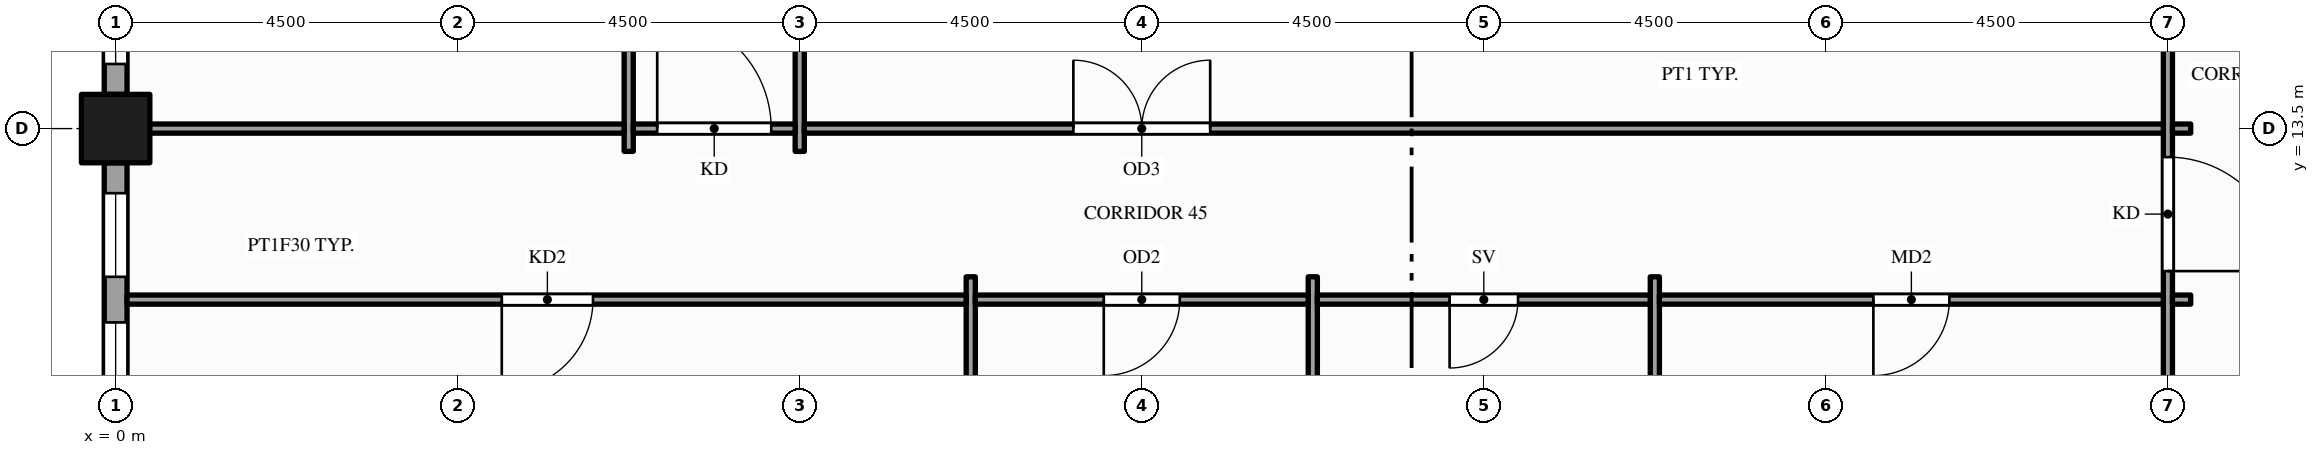
"""IFC4 building model, lengths in metres.
Left out: names, types, materials, properties, quantities, classifications, styles, units other than length and angle.
Written with IfcOpenShell. Run it as: python <this file> out.ifc"""

import sys

from ifc_helpers import new_model, si_unit, direction, frame, frame_2d, origin, origin_2d, place, context, subcontext, project, spatial, rectangle, hollow_rectangle, extrude, element, fill, save


model = new_model("IFC4")
c1 = context("Model", 3, precision=1e-05, world=origin(), true_north=direction((0.0, 1.0)))
c2 = subcontext(c1, "Body", "Model", "MODEL_VIEW")
j1 = project(units=[si_unit("LENGTHUNIT", "METRE"), si_unit("PLANEANGLEUNIT", "RADIAN")], contexts=[c1])
p1 = place(None, origin())
s1 = spatial("IfcSite", under=j1, at=p1, CompositionType="ELEMENT")
p2 = place(p1, origin())
s2 = spatial("IfcBuilding", under=s1, at=p2, CompositionType="ELEMENT")
p3 = place(p2, frame((0.0, 0.0, 171.0)))
s3 = spatial("IfcBuildingStorey", under=s2, at=p3, CompositionType="ELEMENT", Elevation=171.0)
p4 = place(p3, frame((0.0, 13.5, -0.15), z_axis=(0.0, 0.0, 1.0), x_axis=(1.0, 0.0, 0.0)))
e1 = element("IfcColumn", 1, at=p4, inside=s3, PredefinedType="COLUMN", context=c2, shape_type="SweptSolid", body=[
    extrude(hollow_rectangle(XDim=0.9, YDim=0.9, WallThickness=0.045, at=origin_2d()), origin(), (0.0, 0.0, 1.0), 4.0),
])
p5 = place(p3, frame((0.0, 17.55, 0.0), z_axis=(0.0, 0.0, 1.0), x_axis=(0.0, -1.0, 0.0)))
e2 = element("IfcWall", 2, at=p5, inside=s3, PredefinedType="STANDARD", context=c2, shape_type="SweptSolid", body=[
    extrude(rectangle(XDim=3.6, YDim=0.3, at=frame_2d((1.8, 0.0))), origin(), (0.0, 0.0, 1.0), 3.149),
])
p6 = place(p5, frame((0.4, 0.0, 0.9)))
e3 = element("IfcOpeningElement", 3, at=p6, cuts=e2, PredefinedType="OPENING", context=c2, shape_type="SweptSolid", body=[
    extrude(rectangle(XDim=1.1, YDim=2.0, at=frame_2d((0.55, 1.0))), frame((0.0, 0.16, 0.0), z_axis=(0.0, -1.0, 0.0), x_axis=(1.0, 0.0, 0.0)), (0.0, 0.0, 1.0), 0.32),
])
p7 = place(p5, frame((2.1, 0.0, 0.9)))
e4 = element("IfcOpeningElement", 4, at=p7, cuts=e2, PredefinedType="OPENING", context=c2, shape_type="SweptSolid", body=[
    extrude(rectangle(XDim=1.1, YDim=2.0, at=frame_2d((0.55, 1.0))), frame((0.0, 0.16, 0.0), z_axis=(0.0, -1.0, 0.0), x_axis=(1.0, 0.0, 0.0)), (0.0, 0.0, 1.0), 0.32),
])
p8 = place(p3, frame((0.0, 13.05, 0.0), z_axis=(0.0, 0.0, 1.0), x_axis=(0.0, -1.0, 0.0)))
e5 = element("IfcWall", 5, at=p8, inside=s3, PredefinedType="STANDARD", context=c2, shape_type="SweptSolid", body=[
    extrude(rectangle(XDim=3.6, YDim=0.3, at=frame_2d((1.8, 0.0))), origin(), (0.0, 0.0, 1.0), 3.149),
])
p9 = place(p8, frame((0.4, 0.0, 0.9)))
e6 = element("IfcOpeningElement", 6, at=p9, cuts=e5, PredefinedType="OPENING", context=c2, shape_type="SweptSolid", body=[
    extrude(rectangle(XDim=1.1, YDim=2.0, at=frame_2d((0.55, 1.0))), frame((0.0, 0.16, 0.0), z_axis=(0.0, -1.0, 0.0), x_axis=(1.0, 0.0, 0.0)), (0.0, 0.0, 1.0), 0.32),
])
p10 = place(p8, frame((2.1, 0.0, 0.9)))
e7 = element("IfcOpeningElement", 7, at=p10, cuts=e5, PredefinedType="OPENING", context=c2, shape_type="SweptSolid", body=[
    extrude(rectangle(XDim=1.1, YDim=2.0, at=frame_2d((0.55, 1.0))), frame((0.0, 0.16, 0.0), z_axis=(0.0, -1.0, 0.0), x_axis=(1.0, 0.0, 0.0)), (0.0, 0.0, 1.0), 0.32),
])
p11 = place(p3, frame((6.75, 13.2, 0.0), z_axis=(0.0, 0.0, 1.0), x_axis=(0.0, 1.0, 0.0)))
e8 = element("IfcWall", 8, at=p11, inside=s3, PredefinedType="PARTITIONING", context=c2, shape_type="SweptSolid", body=[
    extrude(rectangle(XDim=18.6, YDim=0.12, at=frame_2d((9.3, 0.0))), origin(), (0.0, 0.0, 1.0), 2.6),
])
p12 = place(p11, frame((3.175, 0.0, 0.0)))
e9 = element("IfcOpeningElement", 9, at=p12, cuts=e8, PredefinedType="OPENING", context=c2, shape_type="SweptSolid", body=[
    extrude(rectangle(XDim=1.0, YDim=2.1, at=frame_2d((0.5, 1.05))), frame((0.0, 0.07, 0.0), z_axis=(0.0, -1.0, 0.0), x_axis=(1.0, 0.0, 0.0)), (0.0, 0.0, 1.0), 0.14),
])
p13 = place(p11, frame((9.955, 0.0, 0.0)))
e10 = element("IfcOpeningElement", 10, at=p13, cuts=e8, PredefinedType="OPENING", context=c2, shape_type="SweptSolid", body=[
    extrude(rectangle(XDim=1.0, YDim=2.1, at=frame_2d((0.5, 1.05))), frame((0.0, 0.07, 0.0), z_axis=(0.0, -1.0, 0.0), x_axis=(1.0, 0.0, 0.0)), (0.0, 0.0, 1.0), 0.14),
])
p14 = place(p3, frame((9.0, 13.2, 0.0), z_axis=(0.0, 0.0, 1.0), x_axis=(0.0, 1.0, 0.0)))
e11 = element("IfcWall", 11, at=p14, inside=s3, PredefinedType="PARTITIONING", context=c2, shape_type="SweptSolid", body=[
    extrude(rectangle(XDim=18.6, YDim=0.12, at=frame_2d((9.3, 0.0))), origin(), (0.0, 0.0, 1.0), 2.6),
])
p15 = place(p14, frame((14.325, 0.0, 0.0)))
e12 = element("IfcOpeningElement", 12, at=p15, cuts=e11, PredefinedType="OPENING", context=c2, shape_type="SweptSolid", body=[
    extrude(rectangle(XDim=1.2, YDim=2.1, at=frame_2d((0.6, 1.05))), frame((0.0, 0.07, 0.0), z_axis=(0.0, -1.0, 0.0), x_axis=(1.0, 0.0, 0.0)), (0.0, 0.0, 1.0), 0.14),
])
p16 = place(p14, frame((4.2, 0.0, 0.0)))
e13 = element("IfcOpeningElement", 13, at=p16, cuts=e11, PredefinedType="OPENING", context=c2, shape_type="SweptSolid", body=[
    extrude(rectangle(XDim=1.2, YDim=2.1, at=frame_2d((0.6, 1.05))), frame((0.0, 0.07, 0.0), z_axis=(0.0, -1.0, 0.0), x_axis=(1.0, 0.0, 0.0)), (0.0, 0.0, 1.0), 0.14),
])
for number, where, z_axis, x_axis in (
    (14, (11.25, 0.15, 0.0), (0.0, 0.0, 1.0), (0.0, 1.0, 0.0)),
    (15, (15.75, 0.15, 0.0), (0.0, 0.0, 1.0), (0.0, 1.0, 0.0)),
    (16, (20.25, 0.15, 0.0), (0.0, 0.0, 1.0), (0.0, 1.0, 0.0)),
):
    element("IfcWall", number, at=place(p3, frame(where, z_axis=z_axis, x_axis=x_axis)), inside=s3, PredefinedType="PARTITIONING", context=c2, shape_type="SweptSolid", body=[
        extrude(rectangle(XDim=11.4, YDim=0.12, at=frame_2d((5.7, 0.0))), origin(), (0.0, 0.0, 1.0), 2.87),
    ])
p17 = place(p3, frame((27.0, 1.65, 0.0), z_axis=(0.0, 0.0, 1.0), x_axis=(0.0, 1.0, 0.0)))
e17 = element("IfcWall", 17, at=p17, inside=s3, PredefinedType="PARTITIONING", context=c2, shape_type="SweptSolid", body=[
    extrude(rectangle(XDim=22.2, YDim=0.12, at=frame_2d((11.1, 0.0))), origin(), (0.0, 0.0, 1.0), 2.87),
])
p18 = place(p17, frame((9.975, 0.0, 0.0)))
e18 = element("IfcOpeningElement", 18, at=p18, cuts=e17, PredefinedType="OPENING", context=c2, shape_type="SweptSolid", body=[
    extrude(rectangle(XDim=1.5, YDim=2.1, at=frame_2d((0.75, 1.05))), frame((0.0, 0.07, 0.0), z_axis=(0.0, -1.0, 0.0), x_axis=(1.0, 0.0, 0.0)), (0.0, 0.0, 1.0), 0.14),
])
p19 = place(p17, frame((13.125, 0.0, 0.0)))
e19 = element("IfcOpeningElement", 19, at=p19, cuts=e17, PredefinedType="OPENING", context=c2, shape_type="SweptSolid", body=[
    extrude(rectangle(XDim=1.2, YDim=2.1, at=frame_2d((0.6, 1.05))), frame((0.0, 0.07, 0.0), z_axis=(0.0, -1.0, 0.0), x_axis=(1.0, 0.0, 0.0)), (0.0, 0.0, 1.0), 0.14),
])
p20 = place(p3, frame((0.15, 11.25, 0.0), z_axis=(0.0, 0.0, 1.0), x_axis=(1.0, 0.0, 0.0)))
e20 = element("IfcWall", 20, at=p20, inside=s3, PredefinedType="PARTITIONING", context=c2, shape_type="SweptSolid", body=[
    extrude(rectangle(XDim=11.04, YDim=0.12, at=frame_2d((5.52, 0.0))), origin(), (0.0, 0.0, 1.0), 2.87),
])
p21 = place(p20, frame((4.93, 0.0, 0.0)))
e21 = element("IfcOpeningElement", 21, at=p21, cuts=e20, PredefinedType="OPENING", context=c2, shape_type="SweptSolid", body=[
    extrude(rectangle(XDim=1.2, YDim=2.1, at=frame_2d((0.6, 1.05))), frame((0.0, 0.07, 0.0), z_axis=(0.0, -1.0, 0.0), x_axis=(1.0, 0.0, 0.0)), (0.0, 0.0, 1.0), 0.14),
])
p22 = place(p3, frame((11.31, 11.25, 0.0), z_axis=(0.0, 0.0, 1.0), x_axis=(1.0, 0.0, 0.0)))
e22 = element("IfcWall", 22, at=p22, inside=s3, PredefinedType="PARTITIONING", context=c2, shape_type="SweptSolid", body=[
    extrude(rectangle(XDim=4.38, YDim=0.12, at=frame_2d((2.19, 0.0))), origin(), (0.0, 0.0, 1.0), 2.87),
])
p23 = place(p22, frame((1.69, 0.0, 0.0)))
e23 = element("IfcOpeningElement", 23, at=p23, cuts=e22, PredefinedType="OPENING", context=c2, shape_type="SweptSolid", body=[
    extrude(rectangle(XDim=1.0, YDim=2.1, at=frame_2d((0.5, 1.05))), frame((0.0, 0.07, 0.0), z_axis=(0.0, -1.0, 0.0), x_axis=(1.0, 0.0, 0.0)), (0.0, 0.0, 1.0), 0.14),
])
p24 = place(p3, frame((15.81, 11.25, 0.0), z_axis=(0.0, 0.0, 1.0), x_axis=(1.0, 0.0, 0.0)))
e24 = element("IfcWall", 24, at=p24, inside=s3, PredefinedType="PARTITIONING", context=c2, shape_type="SweptSolid", body=[
    extrude(rectangle(XDim=4.38, YDim=0.12, at=frame_2d((2.19, 0.0))), origin(), (0.0, 0.0, 1.0), 2.87),
])
p25 = place(p24, frame((1.74, 0.0, 0.0)))
e25 = element("IfcOpeningElement", 25, at=p25, cuts=e24, PredefinedType="OPENING", context=c2, shape_type="SweptSolid", body=[
    extrude(rectangle(XDim=0.9, YDim=2.1, at=frame_2d((0.45, 1.05))), frame((0.0, 0.07, 0.0), z_axis=(0.0, -1.0, 0.0), x_axis=(1.0, 0.0, 0.0)), (0.0, 0.0, 1.0), 0.14),
])
p26 = place(p3, frame((20.31, 11.25, 0.0), z_axis=(0.0, 0.0, 1.0), x_axis=(1.0, 0.0, 0.0)))
e26 = element("IfcWall", 26, at=p26, inside=s3, PredefinedType="PARTITIONING", context=c2, shape_type="SweptSolid", body=[
    extrude(rectangle(XDim=6.63, YDim=0.12, at=frame_2d((3.315, 0.0))), origin(), (0.0, 0.0, 1.0), 2.87),
])
p27 = place(p26, frame((2.815, 0.0, 0.0)))
e27 = element("IfcOpeningElement", 27, at=p27, cuts=e26, PredefinedType="OPENING", context=c2, shape_type="SweptSolid", body=[
    extrude(rectangle(XDim=1.0, YDim=2.1, at=frame_2d((0.5, 1.05))), frame((0.0, 0.07, 0.0), z_axis=(0.0, -1.0, 0.0), x_axis=(1.0, 0.0, 0.0)), (0.0, 0.0, 1.0), 0.14),
])
p28 = place(p3, frame((27.06, 11.25, 0.0), z_axis=(0.0, 0.0, 1.0), x_axis=(1.0, 0.0, 0.0)))
e28 = element("IfcWall", 28, at=p28, inside=s3, PredefinedType="PARTITIONING", context=c2, shape_type="SweptSolid", body=[
    extrude(rectangle(XDim=0.24, YDim=0.12, at=frame_2d((0.12, 0.0))), origin(), (0.0, 0.0, 1.0), 2.87),
])
p29 = place(p3, frame((0.15, 13.5, 0.0), z_axis=(0.0, 0.0, 1.0), x_axis=(1.0, 0.0, 0.0)))
e29 = element("IfcWall", 29, at=p29, inside=s3, PredefinedType="PARTITIONING", context=c2, shape_type="SweptSolid", body=[
    extrude(rectangle(XDim=6.54, YDim=0.12, at=frame_2d((3.27, 0.0))), origin(), (0.0, 0.0, 1.0), 2.87),
])
p30 = place(p3, frame((6.81, 13.5, 0.0), z_axis=(0.0, 0.0, 1.0), x_axis=(1.0, 0.0, 0.0)))
e30 = element("IfcWall", 30, at=p30, inside=s3, PredefinedType="PARTITIONING", context=c2, shape_type="SweptSolid", body=[
    extrude(rectangle(XDim=2.13, YDim=0.12, at=frame_2d((1.065, 0.0))), origin(), (0.0, 0.0, 1.0), 2.87),
])
p31 = place(p30, frame((0.315, 0.0, 0.0)))
e31 = element("IfcOpeningElement", 31, at=p31, cuts=e30, PredefinedType="OPENING", context=c2, shape_type="SweptSolid", body=[
    extrude(rectangle(XDim=1.5, YDim=2.1, at=frame_2d((0.75, 1.05))), frame((0.0, 0.07, 0.0), z_axis=(0.0, -1.0, 0.0), x_axis=(1.0, 0.0, 0.0)), (0.0, 0.0, 1.0), 0.14),
])
p32 = place(p3, frame((9.06, 13.5, 0.0), z_axis=(0.0, 0.0, 1.0), x_axis=(1.0, 0.0, 0.0)))
e32 = element("IfcWall", 32, at=p32, inside=s3, PredefinedType="PARTITIONING", context=c2, shape_type="SweptSolid", body=[
    extrude(rectangle(XDim=17.88, YDim=0.12, at=frame_2d((8.94, 0.0))), origin(), (0.0, 0.0, 1.0), 2.87),
])
p33 = place(p32, frame((3.54, 0.0, 0.0)))
e33 = element("IfcOpeningElement", 33, at=p33, cuts=e32, PredefinedType="OPENING", context=c2, shape_type="SweptSolid", body=[
    extrude(rectangle(XDim=1.8, YDim=2.1, at=frame_2d((0.9, 1.05))), frame((0.0, 0.07, 0.0), z_axis=(0.0, -1.0, 0.0), x_axis=(1.0, 0.0, 0.0)), (0.0, 0.0, 1.0), 0.14),
])
p34 = place(p3, frame((27.06, 13.5, 0.0), z_axis=(0.0, 0.0, 1.0), x_axis=(1.0, 0.0, 0.0)))
e34 = element("IfcWall", 34, at=p34, inside=s3, PredefinedType="PARTITIONING", context=c2, shape_type="SweptSolid", body=[
    extrude(rectangle(XDim=0.24, YDim=0.12, at=frame_2d((0.12, 0.0))), origin(), (0.0, 0.0, 1.0), 2.87),
])
p35 = place(p7, origin())
e35 = element("IfcWindow", 35, at=p35, inside=s3, PartitioningType="SINGLE_PANEL", PredefinedType="WINDOW", context=c2, shape_type="SweptSolid", body=[
    extrude(rectangle(XDim=1.1, YDim=2.0, at=frame_2d((0.55, 1.0))), frame((0.0, 0.03, 0.0), z_axis=(0.0, -1.0, 0.0), x_axis=(1.0, 0.0, 0.0)), (0.0, 0.0, 1.0), 0.06),
])
fill(e4, e35)
p36 = place(p9, origin())
e36 = element("IfcWindow", 36, at=p36, inside=s3, PartitioningType="SINGLE_PANEL", PredefinedType="WINDOW", context=c2, shape_type="SweptSolid", body=[
    extrude(rectangle(XDim=1.1, YDim=2.0, at=frame_2d((0.55, 1.0))), frame((0.0, 0.03, 0.0), z_axis=(0.0, -1.0, 0.0), x_axis=(1.0, 0.0, 0.0)), (0.0, 0.0, 1.0), 0.06),
])
fill(e6, e36)
p37 = place(p10, origin())
e37 = element("IfcWindow", 37, at=p37, inside=s3, PartitioningType="SINGLE_PANEL", PredefinedType="WINDOW", context=c2, shape_type="SweptSolid", body=[
    extrude(rectangle(XDim=1.1, YDim=2.0, at=frame_2d((0.55, 1.0))), frame((0.0, 0.03, 0.0), z_axis=(0.0, -1.0, 0.0), x_axis=(1.0, 0.0, 0.0)), (0.0, 0.0, 1.0), 0.06),
])
fill(e7, e37)
p38 = place(p18, origin())
e38 = element("IfcDoor", 38, at=p38, inside=s3, OperationType="SINGLE_SWING_LEFT", PredefinedType="DOOR", context=c2, shape_type="SweptSolid", body=[
    extrude(rectangle(XDim=1.5, YDim=2.1, at=frame_2d((0.75, 1.05))), frame((0.0, 0.025, 0.0), z_axis=(0.0, -1.0, 0.0), x_axis=(1.0, 0.0, 0.0)), (0.0, 0.0, 1.0), 0.05),
])
fill(e18, e38)
p39 = place(p21, origin())
e39 = element("IfcDoor", 39, at=p39, inside=s3, OperationType="SINGLE_SWING_LEFT", PredefinedType="DOOR", context=c2, shape_type="SweptSolid", body=[
    extrude(rectangle(XDim=1.2, YDim=2.1, at=frame_2d((0.6, 1.05))), frame((0.0, 0.025, 0.0), z_axis=(0.0, -1.0, 0.0), x_axis=(1.0, 0.0, 0.0)), (0.0, 0.0, 1.0), 0.05),
])
fill(e21, e39)
p40 = place(p23, origin())
e40 = element("IfcDoor", 40, at=p40, inside=s3, OperationType="SINGLE_SWING_LEFT", PredefinedType="DOOR", context=c2, shape_type="SweptSolid", body=[
    extrude(rectangle(XDim=1.0, YDim=2.1, at=frame_2d((0.5, 1.05))), frame((0.0, 0.025, 0.0), z_axis=(0.0, -1.0, 0.0), x_axis=(1.0, 0.0, 0.0)), (0.0, 0.0, 1.0), 0.05),
])
fill(e23, e40)
p41 = place(p25, origin())
e41 = element("IfcDoor", 41, at=p41, inside=s3, OperationType="SINGLE_SWING_LEFT", PredefinedType="DOOR", context=c2, shape_type="SweptSolid", body=[
    extrude(rectangle(XDim=0.9, YDim=2.1, at=frame_2d((0.45, 1.05))), frame((0.0, 0.025, 0.0), z_axis=(0.0, -1.0, 0.0), x_axis=(1.0, 0.0, 0.0)), (0.0, 0.0, 1.0), 0.05),
])
fill(e25, e41)
p42 = place(p27, origin())
e42 = element("IfcDoor", 42, at=p42, inside=s3, OperationType="SINGLE_SWING_LEFT", PredefinedType="DOOR", context=c2, shape_type="SweptSolid", body=[
    extrude(rectangle(XDim=1.0, YDim=2.1, at=frame_2d((0.5, 1.05))), frame((0.0, 0.025, 0.0), z_axis=(0.0, -1.0, 0.0), x_axis=(1.0, 0.0, 0.0)), (0.0, 0.0, 1.0), 0.05),
])
fill(e27, e42)
p43 = place(p33, origin())
e43 = element("IfcDoor", 43, at=p43, inside=s3, OperationType="DOUBLE_DOOR_SINGLE_SWING", PredefinedType="DOOR", context=c2, shape_type="SweptSolid", body=[
    extrude(rectangle(XDim=1.8, YDim=2.1, at=frame_2d((0.9, 1.05))), frame((0.0, 0.025, 0.0), z_axis=(0.0, -1.0, 0.0), x_axis=(1.0, 0.0, 0.0)), (0.0, 0.0, 1.0), 0.05),
])
fill(e33, e43)
p44 = place(p31, origin())
e44 = element("IfcDoor", 44, at=p44, inside=s3, OperationType="SINGLE_SWING_LEFT", PredefinedType="DOOR", context=c2, shape_type="SweptSolid", body=[
    extrude(rectangle(XDim=1.5, YDim=2.1, at=frame_2d((0.75, 1.05))), frame((0.0, 0.025, 0.0), z_axis=(0.0, -1.0, 0.0), x_axis=(1.0, 0.0, 0.0)), (0.0, 0.0, 1.0), 0.05),
])
fill(e31, e44)
save(model, sys.argv[1])
